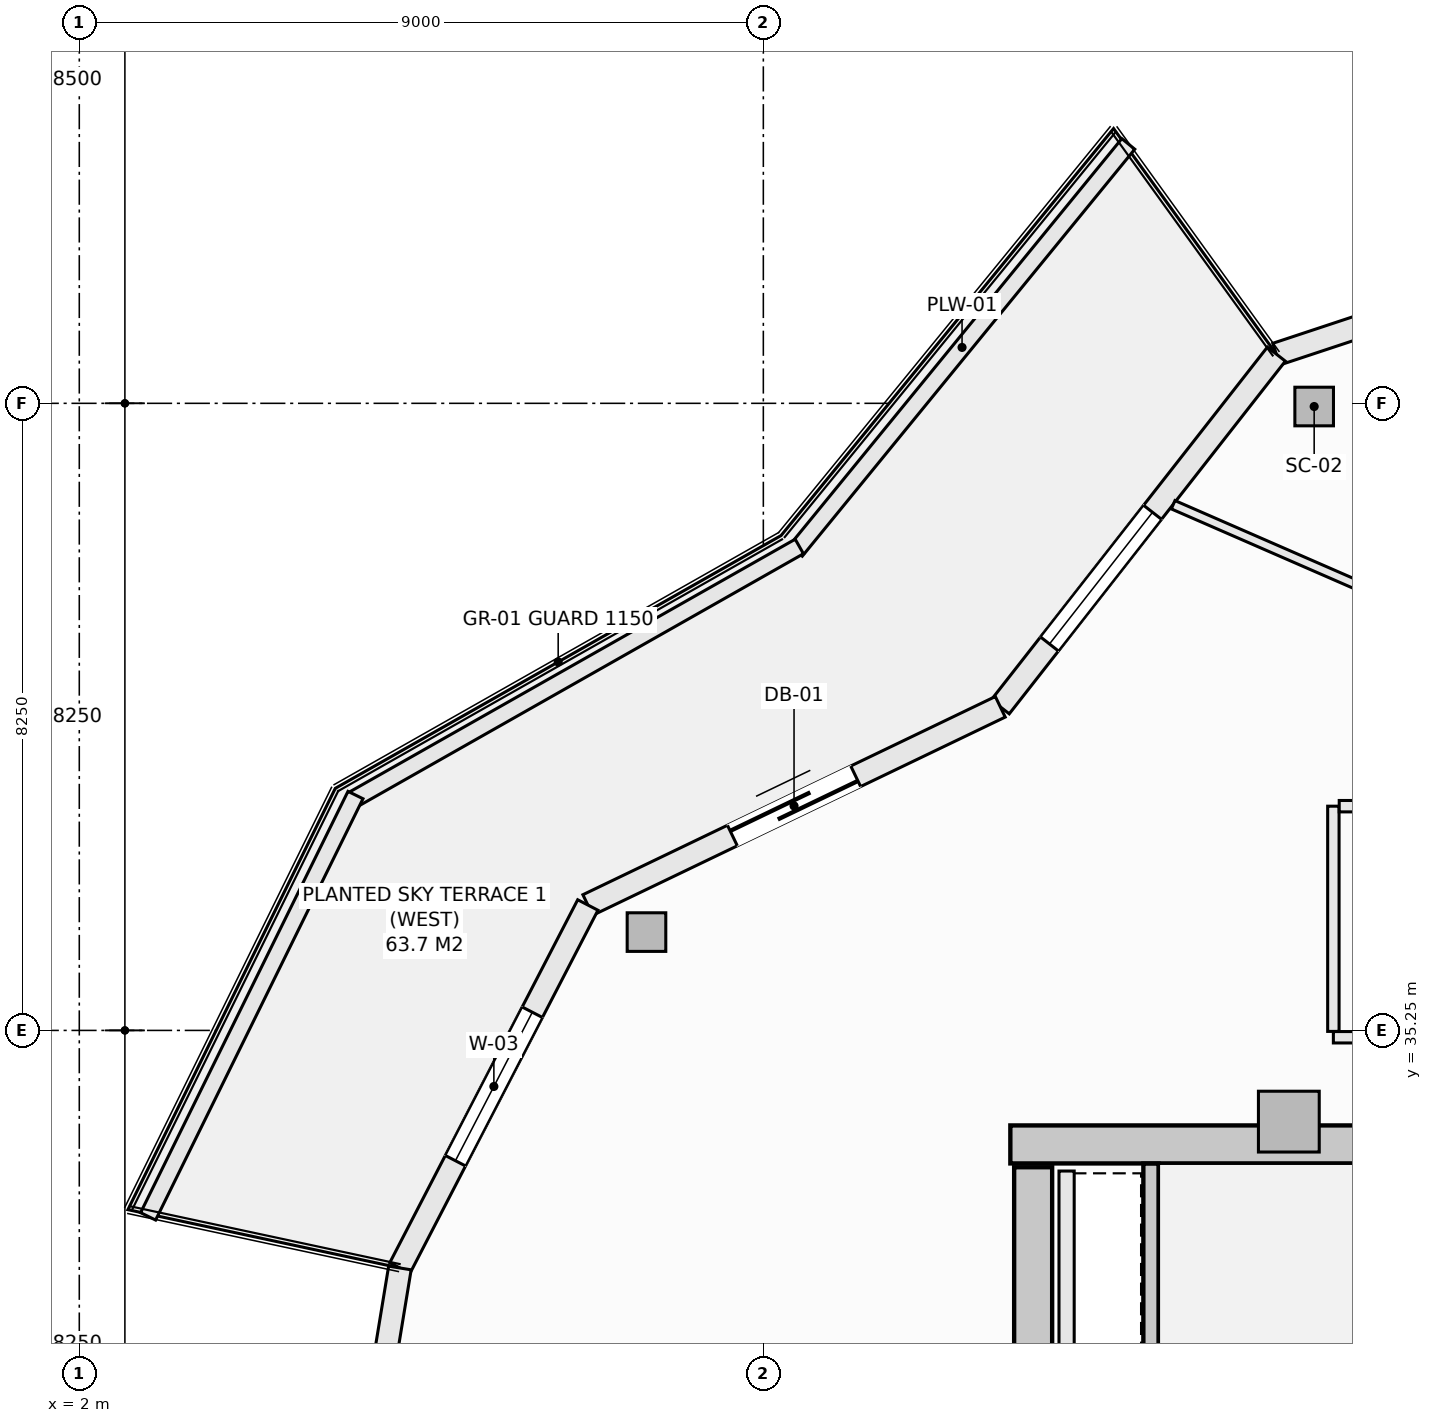
"""IFC4 building model, lengths in metres.
Left out: names, types, materials, properties, quantities, classifications, styles, units other than length and angle.
Written with IfcOpenShell. Run it as: python <this file> out.ifc"""

import sys

from ifc_helpers import new_model, si_unit, direction, frame, frame_2d, origin, origin_2d, place, context, subcontext, project, spatial, rectangle, hollow_rectangle, extrude, element, fill, save


model = new_model("IFC4")
c1 = context("Model", 3, precision=1e-05, world=origin(), true_north=direction((0.0, 1.0)))
c2 = subcontext(c1, "Body", "Model", "MODEL_VIEW")
j1 = project(units=[si_unit("LENGTHUNIT", "METRE"), si_unit("PLANEANGLEUNIT", "RADIAN")], contexts=[c1])
p1 = place(None, origin())
s1 = spatial("IfcSite", under=j1, at=p1, CompositionType="ELEMENT")
p2 = place(p1, origin())
s2 = spatial("IfcBuilding", under=s1, at=p2, CompositionType="ELEMENT")
p3 = place(p2, frame((0.0, 0.0, 232.7)))
s3 = spatial("IfcBuildingStorey", under=s2, at=p3, CompositionType="ELEMENT", Elevation=232.7)
p4 = place(p3, frame((14.25, 33.75, -0.27), z_axis=(0.0, 0.0, 1.0), x_axis=(1.0, 0.0, 0.0)))
e1 = element("IfcWall", 1, at=p4, inside=s3, PredefinedType="SHEAR", context=c2, shape_type="SweptSolid", body=[
    extrude(rectangle(XDim=13.5, YDim=0.5, at=frame_2d((6.75, 0.0))), origin(), (0.0, 0.0, 1.0), 3.3),
])
p5 = place(p3, frame((14.55, 20.55, -0.27), z_axis=(0.0, 0.0, 1.0), x_axis=(0.0, 1.0, 0.0)))
e2 = element("IfcWall", 2, at=p5, inside=s3, PredefinedType="SHEAR", context=c2, shape_type="SweptSolid", body=[
    extrude(rectangle(XDim=12.9, YDim=0.5, at=frame_2d((6.45, 0.0))), origin(), (0.0, 0.0, 1.0), 3.3),
])
for number, where, z_axis, x_axis in (
    (3, (18.247, 43.458, -0.27), (0.0, 0.0, 1.0), (1.0, 0.0, 0.0)),
    (4, (9.463, 36.544, -0.27), (0.0, 0.0, 1.0), (1.0, 0.0, 0.0)),
):
    element("IfcColumn", number, at=place(p3, frame(where, z_axis=z_axis, x_axis=x_axis)), inside=s3, PredefinedType="COLUMN", context=c2, shape_type="SweptSolid", body=[
        extrude(hollow_rectangle(XDim=0.508, YDim=0.508, WallThickness=0.019, at=origin_2d()), origin(), (0.0, 0.0, 1.0), 3.3),
    ])
p6 = place(p3, frame((17.914, 34.05, -0.27), z_axis=(0.0, 0.0, 1.0), x_axis=(1.0, 0.0, 0.0)))
e5 = element("IfcColumn", 5, at=p6, inside=s3, PredefinedType="PILASTER", context=c2, shape_type="SweptSolid", body=[
    extrude(rectangle(XDim=0.8, YDim=0.8, at=origin_2d()), origin(), (0.0, 0.0, 1.0), 3.3),
])
p7 = place(p3, frame((17.75, 44.147, 0.0), z_axis=(0.0, 0.0, 1.0), x_axis=(0.949240877604, 0.314550085495, 0.0)))
e6 = element("IfcWall", 6, at=p7, inside=s3, PredefinedType="SOLIDWALL", context=c2, shape_type="SweptSolid", body=[
    extrude(rectangle(XDim=6.288, YDim=0.3, at=frame_2d((3.144, 0.0))), origin(), (0.0, 0.0, 1.0), 2.605),
])
p8 = place(p7, frame((2.044, 0.0, 0.72)))
e7 = element("IfcOpeningElement", 7, at=p8, cuts=e6, PredefinedType="OPENING", context=c2, shape_type="SweptSolid", body=[
    extrude(rectangle(XDim=2.2, YDim=1.65, at=frame_2d((1.1, 0.825))), frame((0.0, 0.16, 0.0), z_axis=(0.0, -1.0, 0.0), x_axis=(1.0, 0.0, 0.0)), (0.0, 0.0, 1.0), 0.32),
])
p9 = place(p3, frame((14.117, 39.507, 0.0), z_axis=(0.0, 0.0, 1.0), x_axis=(0.616450126935, 0.787393955401, 0.0)))
e8 = element("IfcWall", 8, at=p9, inside=s3, PredefinedType="SOLIDWALL", context=c2, shape_type="SweptSolid", body=[
    extrude(rectangle(XDim=5.893, YDim=0.3, at=frame_2d((2.946, 0.0))), origin(), (0.0, 0.0, 1.0), 2.605),
])
p10 = place(p9, frame((1.05, 0.0, 0.72)))
e9 = element("IfcOpeningElement", 9, at=p10, cuts=e8, PredefinedType="OPENING", context=c2, shape_type="SweptSolid", body=[
    extrude(rectangle(XDim=2.2, YDim=1.65, at=frame_2d((1.1, 0.825))), frame((0.0, 0.16, 0.0), z_axis=(0.0, -1.0, 0.0), x_axis=(1.0, 0.0, 0.0)), (0.0, 0.0, 1.0), 0.32),
])
p11 = place(p3, frame((8.691, 36.9, 0.0), z_axis=(0.0, 0.0, 1.0), x_axis=(0.901348331142, 0.433094892545, 0.0)))
e10 = element("IfcWall", 10, at=p11, inside=s3, PredefinedType="SOLIDWALL", context=c2, shape_type="SweptSolid", body=[
    extrude(rectangle(XDim=6.021, YDim=0.3, at=frame_2d((3.01, 0.0))), origin(), (0.0, 0.0, 1.0), 2.605),
])
p12 = place(p11, frame((2.11, 0.0, 0.0)))
e11 = element("IfcOpeningElement", 11, at=p12, cuts=e10, PredefinedType="OPENING", context=c2, shape_type="SweptSolid", body=[
    extrude(rectangle(XDim=1.8, YDim=2.25, at=frame_2d((0.9, 1.125))), frame((0.0, 0.16, 0.0), z_axis=(0.0, -1.0, 0.0), x_axis=(1.0, 0.0, 0.0)), (0.0, 0.0, 1.0), 0.32),
])
p13 = place(p3, frame((6.218, 32.125, 0.0), z_axis=(0.0, 0.0, 1.0), x_axis=(0.459808219482, 0.888018243786, 0.0)))
e12 = element("IfcWall", 12, at=p13, inside=s3, PredefinedType="SOLIDWALL", context=c2, shape_type="SweptSolid", body=[
    extrude(rectangle(XDim=5.378, YDim=0.3, at=frame_2d((2.689, 0.0))), origin(), (0.0, 0.0, 1.0), 2.605),
])
p14 = place(p13, frame((1.589, 0.0, 0.72)))
e13 = element("IfcOpeningElement", 13, at=p14, cuts=e12, PredefinedType="OPENING", context=c2, shape_type="SweptSolid", body=[
    extrude(rectangle(XDim=2.2, YDim=1.65, at=frame_2d((1.1, 0.825))), frame((0.0, 0.16, 0.0), z_axis=(0.0, -1.0, 0.0), x_axis=(1.0, 0.0, 0.0)), (0.0, 0.0, 1.0), 0.32),
])
p15 = place(p3, frame((5.375, 27.0, 0.0), z_axis=(0.0, 0.0, 1.0), x_axis=(0.16237087798, 0.986729799886, 0.0)))
e14 = element("IfcWall", 14, at=p15, inside=s3, PredefinedType="SOLIDWALL", context=c2, shape_type="SweptSolid", body=[
    extrude(rectangle(XDim=5.193, YDim=0.3, at=frame_2d((2.597, 0.0))), origin(), (0.0, 0.0, 1.0), 2.605),
])
p16 = place(p15, frame((1.497, 0.0, 0.72)))
e15 = element("IfcOpeningElement", 15, at=p16, cuts=e14, PredefinedType="OPENING", context=c2, shape_type="SweptSolid", body=[
    extrude(rectangle(XDim=2.2, YDim=1.65, at=frame_2d((1.1, 0.825))), frame((0.0, 0.16, 0.0), z_axis=(0.0, -1.0, 0.0), x_axis=(1.0, 0.0, 0.0)), (0.0, 0.0, 1.0), 0.32),
])
p17 = place(p3, frame((11.427, 41.559, 0.0), z_axis=(0.0, 0.0, 1.0), x_axis=(0.632697312147, 0.774399193699, 0.0)))
e16 = element("IfcWall", 16, at=p17, inside=s3, PredefinedType="PARAPET", context=c2, shape_type="SweptSolid", body=[
    extrude(rectangle(XDim=6.914, YDim=0.22, at=frame_2d((3.457, 0.0))), origin(), (0.0, 0.0, 1.0), 0.52),
])
p18 = place(p3, frame((5.608, 38.291, 0.0), z_axis=(0.0, 0.0, 1.0), x_axis=(0.869860619267, 0.493297580623, 0.0)))
e17 = element("IfcWall", 17, at=p18, inside=s3, PredefinedType="PARAPET", context=c2, shape_type="SweptSolid", body=[
    extrude(rectangle(XDim=6.743, YDim=0.22, at=frame_2d((3.371, 0.0))), origin(), (0.0, 0.0, 1.0), 0.52),
])
p19 = place(p3, frame((2.906, 32.804, 0.0), z_axis=(0.0, 0.0, 1.0), x_axis=(0.441640961804, 0.897191875162, 0.0)))
e18 = element("IfcWall", 18, at=p19, inside=s3, PredefinedType="PARAPET", context=c2, shape_type="SweptSolid", body=[
    extrude(rectangle(XDim=6.178, YDim=0.22, at=frame_2d((3.089, 0.0))), origin(), (0.0, 0.0, 1.0), 0.52),
])
p20 = place(p3, frame((16.1, 30.462, -0.27), z_axis=(0.0, 0.0, 1.0), x_axis=(0.0, 1.0, 0.0)))
e19 = element("IfcWall", 19, at=p20, inside=s3, PredefinedType="SHEAR", context=c2, shape_type="SweptSolid", body=[
    extrude(rectangle(XDim=3.036, YDim=0.2, at=frame_2d((1.518, 0.0))), origin(), (0.0, 0.0, 1.0), 3.3),
])
p21 = place(p3, frame((14.99, 30.55, 0.0), z_axis=(0.0, 0.0, 1.0), x_axis=(0.0, 1.0, 0.0)))
e20 = element("IfcWall", 20, at=p21, inside=s3, PredefinedType="SOLIDWALL", context=c2, shape_type="SweptSolid", body=[
    extrude(rectangle(XDim=2.85, YDim=0.2, at=frame_2d((1.425, 0.0))), origin(), (0.0, 0.0, 1.0), 3.03),
])
p22 = place(p3, frame((18.5, 35.16, 0.0), z_axis=(0.0, 0.0, 1.0), x_axis=(1.0, 0.0, 0.0)))
e21 = element("IfcWall", 21, at=p22, inside=s3, PredefinedType="PARTITIONING", context=c2, shape_type="SweptSolid", body=[
    extrude(rectangle(XDim=8.573, YDim=0.15, at=frame_2d((4.287, 0.0))), origin(), (0.0, 0.0, 1.0), 3.03),
])
p23 = place(p3, frame((18.5, 35.237, 0.0), z_axis=(0.0, 0.0, 1.0), x_axis=(0.0, 1.0, 0.0)))
e22 = element("IfcWall", 22, at=p23, inside=s3, PredefinedType="PARTITIONING", context=c2, shape_type="SweptSolid", body=[
    extrude(rectangle(XDim=2.963, YDim=0.15, at=frame_2d((1.481, 0.0))), origin(), (0.0, 0.0, 1.0), 3.03),
])
p24 = place(p3, frame((18.577, 38.2, 0.0), z_axis=(0.0, 0.0, 1.0), x_axis=(1.0, 0.0, 0.0)))
e23 = element("IfcWall", 23, at=p24, inside=s3, PredefinedType="PARTITIONING", context=c2, shape_type="SweptSolid", body=[
    extrude(rectangle(XDim=8.496, YDim=0.15, at=frame_2d((4.248, 0.0))), origin(), (0.0, 0.0, 1.0), 3.03),
])
p25 = place(p3, frame((16.392, 42.166, 0.0), z_axis=(0.0, 0.0, 1.0), x_axis=(0.916624998673, -0.399748185496, 0.0)))
e24 = element("IfcWall", 24, at=p25, inside=s3, PredefinedType="PARTITIONING", context=c2, shape_type="SweptSolid", body=[
    extrude(rectangle(XDim=9.728, YDim=0.12, at=frame_2d((4.864, 0.0))), origin(), (0.0, 0.0, 1.0), 2.478),
])
p26 = place(p10, origin())
e25 = element("IfcWindow", 25, at=p26, inside=s3, PartitioningType="SINGLE_PANEL", PredefinedType="WINDOW", context=c2, shape_type="SweptSolid", body=[
    extrude(rectangle(XDim=2.2, YDim=1.65, at=frame_2d((1.1, 0.825))), frame((0.0, 0.03, 0.0), z_axis=(0.0, -1.0, 0.0), x_axis=(1.0, 0.0, 0.0)), (0.0, 0.0, 1.0), 0.06),
])
fill(e9, e25)
p27 = place(p12, origin())
e26 = element("IfcDoor", 26, at=p27, inside=s3, OperationType="SLIDING_TO_LEFT", PredefinedType="DOOR", context=c2, shape_type="SweptSolid", body=[
    extrude(rectangle(XDim=1.8, YDim=2.25, at=frame_2d((0.9, 1.125))), frame((0.0, 0.025, 0.0), z_axis=(0.0, -1.0, 0.0), x_axis=(1.0, 0.0, 0.0)), (0.0, 0.0, 1.0), 0.05),
])
fill(e11, e26)
p28 = place(p14, origin())
e27 = element("IfcWindow", 27, at=p28, inside=s3, PartitioningType="SINGLE_PANEL", PredefinedType="WINDOW", context=c2, shape_type="SweptSolid", body=[
    extrude(rectangle(XDim=2.2, YDim=1.65, at=frame_2d((1.1, 0.825))), frame((0.0, 0.03, 0.0), z_axis=(0.0, -1.0, 0.0), x_axis=(1.0, 0.0, 0.0)), (0.0, 0.0, 1.0), 0.06),
])
fill(e13, e27)
save(model, sys.argv[1])
